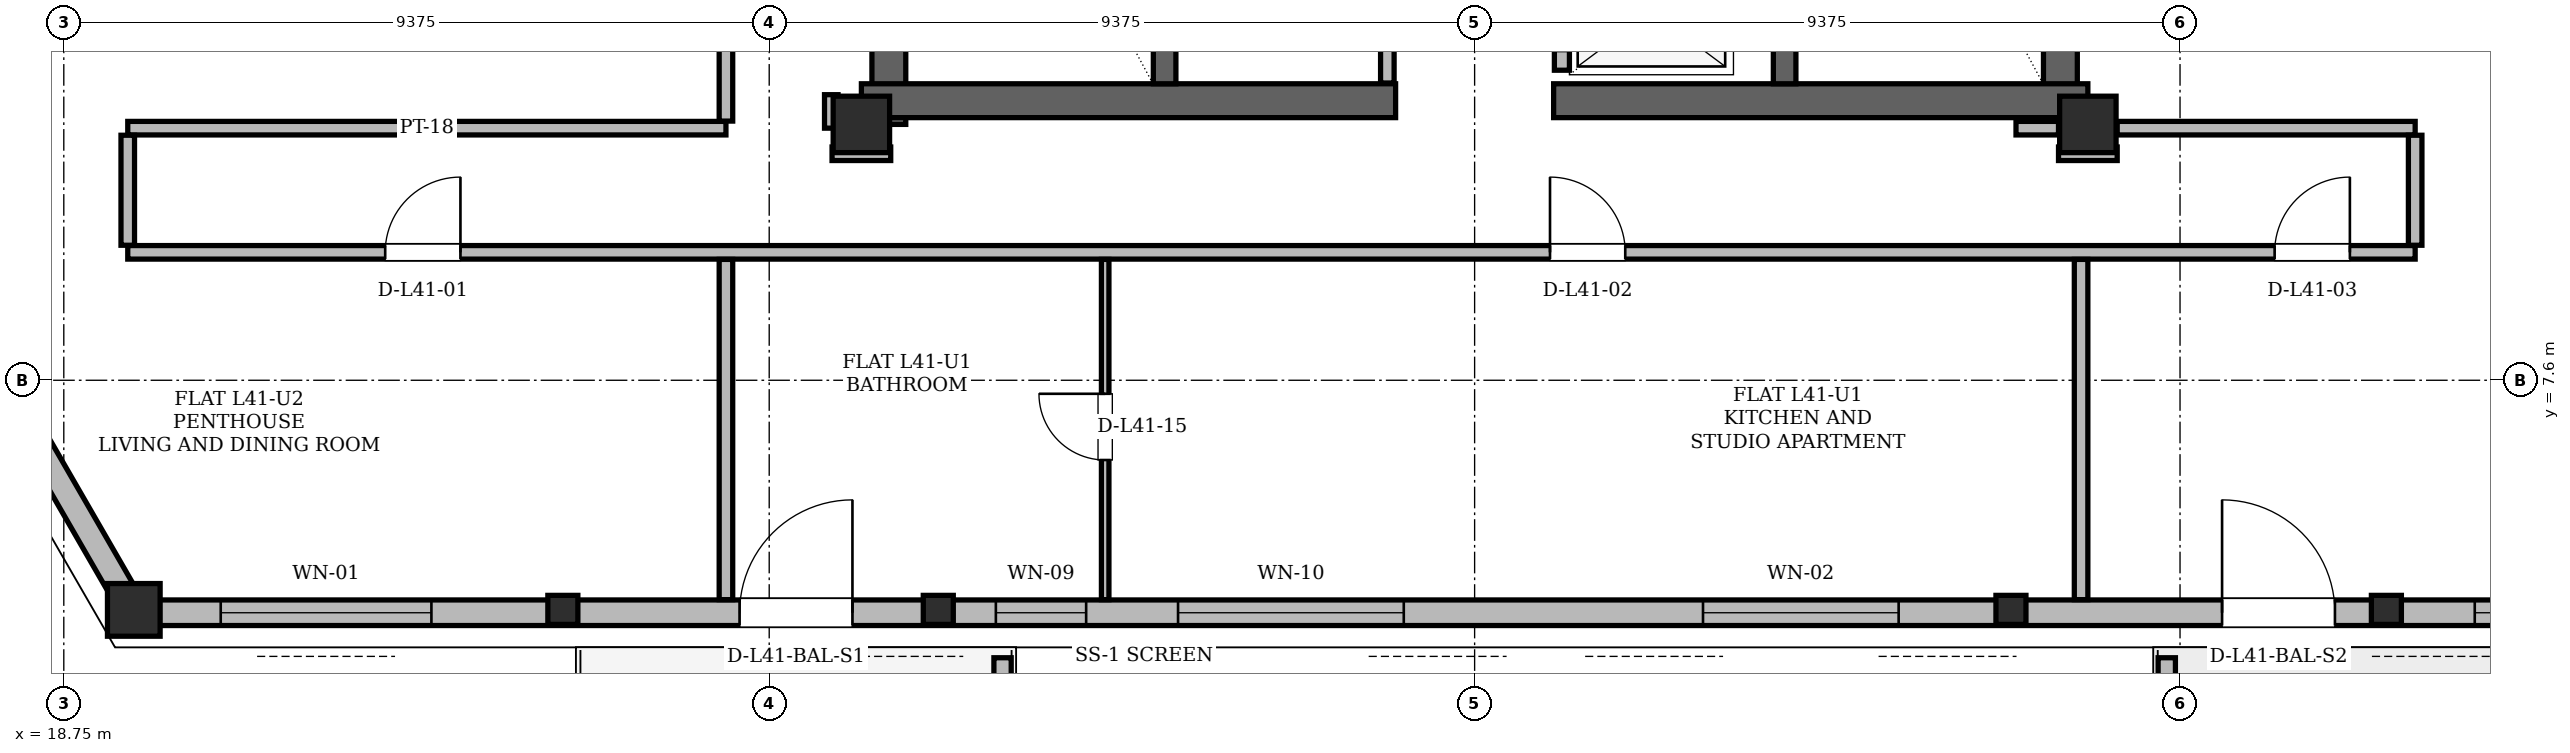
"""IFC4 building model, lengths in metres.
Left out: names, types, materials, properties, quantities, classifications, styles, units other than length and angle.
Written with IfcOpenShell. Run it as: python <this file> out.ifc"""

import sys

from ifc_helpers import new_model, si_unit, direction, frame, frame_2d, origin, origin_2d, place, context, subcontext, project, spatial, polyline, rectangle, hollow_rectangle, i_section, outline, extrude, element, fill, save


model = new_model("IFC4")
c1 = context("Model", 3, precision=1e-05, world=origin(), true_north=direction((0.0, 1.0)))
c2 = subcontext(c1, "Body", "Model", "MODEL_VIEW")
j1 = project(units=[si_unit("LENGTHUNIT", "METRE"), si_unit("PLANEANGLEUNIT", "RADIAN")], contexts=[c1])
p1 = place(None, origin())
s1 = spatial("IfcSite", under=j1, at=p1, CompositionType="ELEMENT")
p2 = place(p1, origin())
s2 = spatial("IfcBuilding", under=s1, at=p2, CompositionType="ELEMENT")
p3 = place(p2, frame((0.0, 0.0, 156.6)))
s3 = spatial("IfcBuildingStorey", under=s2, at=p3, CompositionType="ELEMENT", Elevation=156.6)
for number, where, z_axis, x_axis in (
    (1, (29.35, 11.0, 0.0), (0.0, 0.0, 1.0), (1.0, 0.0, 0.0)),
    (2, (45.65, 11.0, 0.0), (0.0, 0.0, 1.0), (1.0, 0.0, 0.0)),
):
    element("IfcColumn", number, at=place(p3, frame(where, z_axis=z_axis, x_axis=x_axis)), inside=s3, PredefinedType="COLUMN", context=c2, shape_type="SweptSolid", body=[
        extrude(hollow_rectangle(XDim=0.75, YDim=0.75, WallThickness=0.06, at=origin_2d()), origin(), (0.0, 0.0, 1.0), 3.6),
    ])
p4 = place(p3, frame((19.697, 4.511, 0.004), z_axis=(-0.009175617142, 0.021137903194, 0.999734463294), x_axis=(-0.917304359682, -0.398186779926, 0.0)))
e3 = element("IfcColumn", 3, at=p4, inside=s3, PredefinedType="COLUMN", context=c2, shape_type="SweptSolid", body=[
    extrude(hollow_rectangle(XDim=0.7, YDim=0.7, WallThickness=0.055, at=origin_2d()), origin(), (0.0, 0.0, 1.0), 3.592),
])
p5 = place(p3, frame((25.394, 4.511, 0.004), z_axis=(-0.006253154148, 0.021138379783, 0.999757003958), x_axis=(-0.958922443526, -0.283668375577, 0.0)))
e4 = element("IfcColumn", 4, at=p5, inside=s3, PredefinedType="COLUMN", context=c2, shape_type="SweptSolid", body=[
    extrude(i_section(OverallWidth=0.399, OverallDepth=0.386, WebThickness=0.021, FlangeThickness=0.033, at=origin_2d()), origin(), (0.0, 0.0, 1.0), 3.592),
])
for number, where, z_axis, x_axis in (
    (5, (30.379, 4.511, 0.004), (-0.004, 0.021, 1.0), (-0.985, -0.171, 0.0)),
    (6, (44.621, 4.511, 0.004), (0.004, 0.021, 1.0), (-0.985, 0.171, 0.0)),
):
    element("IfcColumn", number, at=place(p3, frame(where, z_axis=z_axis, x_axis=x_axis)), inside=s3, PredefinedType="COLUMN", context=c2, shape_type="SweptSolid", body=[
        extrude(i_section(OverallWidth=0.399, OverallDepth=0.386, WebThickness=0.021, FlangeThickness=0.033, at=origin_2d()), origin(), (0.0, 0.0, 1.0), 3.592),
    ])
p6 = place(p3, frame((49.606, 4.511, 0.004), z_axis=(0.006253154148, 0.021138379783, 0.999757003958), x_axis=(-0.958922443526, 0.283668375577, 0.0)))
e7 = element("IfcColumn", 7, at=p6, inside=s3, PredefinedType="COLUMN", context=c2, shape_type="SweptSolid", body=[
    extrude(i_section(OverallWidth=0.399, OverallDepth=0.386, WebThickness=0.021, FlangeThickness=0.033, at=origin_2d()), origin(), (0.0, 0.0, 1.0), 3.592),
])
for number, where, z_axis, x_axis in (
    (8, (29.715, 11.0, 0.0), (0.0, 0.0, 1.0), (0.0, 1.0, 0.0)),
    (9, (45.285, 11.0, 0.0), (0.0, 0.0, 1.0), (0.0, 1.0, 0.0)),
):
    element("IfcWall", number, at=place(p3, frame(where, z_axis=z_axis, x_axis=x_axis)), inside=s3, PredefinedType="SHEAR", context=c2, shape_type="SweptSolid", body=[
        extrude(rectangle(XDim=13.3, YDim=0.45, at=frame_2d((6.65, 0.0))), origin(), (0.0, 0.0, 1.0), 3.38),
    ])
for number, where, z_axis, x_axis in (
    (10, (29.35, 11.315, 0.0), (0.0, 0.0, 1.0), (1.0, 0.0, 0.0)),
    (11, (38.55, 11.315, 0.0), (0.0, 0.0, 1.0), (1.0, 0.0, 0.0)),
):
    element("IfcWall", number, at=place(p3, frame(where, z_axis=z_axis, x_axis=x_axis)), inside=s3, PredefinedType="SHEAR", context=c2, shape_type="SweptSolid", body=[
        extrude(rectangle(XDim=7.1, YDim=0.45, at=frame_2d((3.55, 0.0))), origin(), (0.0, 0.0, 1.0), 3.38),
    ])
for number, where, z_axis, x_axis in (
    (12, (33.38, 11.54, 0.0), (0.0, 0.0, 1.0), (0.0, 1.0, 0.0)),
    (13, (41.62, 11.54, 0.0), (0.0, 0.0, 1.0), (0.0, 1.0, 0.0)),
):
    element("IfcWall", number, at=place(p3, frame(where, z_axis=z_axis, x_axis=x_axis)), inside=s3, PredefinedType="SHEAR", context=c2, shape_type="SweptSolid", body=[
        extrude(rectangle(XDim=7.62, YDim=0.3, at=frame_2d((3.81, 0.0))), origin(), (0.0, 0.0, 1.0), 3.38),
    ])
p7 = place(p3, frame((15.098, 12.477, 0.0), z_axis=(0.0, 0.0, 1.0), x_axis=(0.500004288242, -0.866022927952, 0.0)))
e14 = element("IfcWall", 14, at=p7, inside=s3, PredefinedType="SOLIDWALL", context=c2, shape_type="SweptSolid", body=[
    extrude(rectangle(XDim=9.198, YDim=0.34, at=frame_2d((4.599, 0.0))), origin(), (0.0, 0.0, 1.0), 2.6),
])
p8 = place(p3, frame((19.697, 4.511, 0.0), z_axis=(0.0, 0.0, 1.0), x_axis=(1.0, 0.0, 0.0)))
e15 = element("IfcWall", 15, at=p8, inside=s3, PredefinedType="SOLIDWALL", context=c2, shape_type="SweptSolid", body=[
    extrude(rectangle(XDim=35.606, YDim=0.34, at=frame_2d((17.803, 0.0))), origin(), (0.0, 0.0, 1.0), 2.6),
])
p9 = place(p8, frame((8.034, 0.0, 0.0)))
e16 = element("IfcOpeningElement", 16, at=p9, cuts=e15, PredefinedType="OPENING", context=c2, shape_type="SweptSolid", body=[
    extrude(rectangle(XDim=1.5, YDim=2.2, at=frame_2d((0.75, 1.1))), frame((0.0, 0.17, 0.0), z_axis=(0.0, -1.0, 0.0), x_axis=(1.0, 0.0, 0.0)), (0.0, 0.0, 1.0), 0.34),
])
p10 = place(p8, frame((27.737, 0.0, 0.0)))
e17 = element("IfcOpeningElement", 17, at=p10, cuts=e15, PredefinedType="OPENING", context=c2, shape_type="SweptSolid", body=[
    extrude(rectangle(XDim=1.5, YDim=2.2, at=frame_2d((0.75, 1.1))), frame((0.0, 0.17, 0.0), z_axis=(0.0, -1.0, 0.0), x_axis=(1.0, 0.0, 0.0)), (0.0, 0.0, 1.0), 0.34),
])
p11 = place(p8, frame((13.862, 0.0, 0.85)))
e18 = element("IfcOpeningElement", 18, at=p11, cuts=e15, PredefinedType="OPENING", context=c2, shape_type="SweptSolid", body=[
    extrude(rectangle(XDim=3.0, YDim=1.64, at=frame_2d((1.5, 0.82))), frame((0.0, 0.17, 0.0), z_axis=(0.0, -1.0, 0.0), x_axis=(1.0, 0.0, 0.0)), (0.0, 0.0, 1.0), 0.34),
])
p12 = place(p8, frame((20.838, 0.0, 0.85)))
e19 = element("IfcOpeningElement", 19, at=p12, cuts=e15, PredefinedType="OPENING", context=c2, shape_type="SweptSolid", body=[
    extrude(rectangle(XDim=2.6, YDim=1.64, at=frame_2d((1.3, 0.82))), frame((0.0, 0.17, 0.0), z_axis=(0.0, -1.0, 0.0), x_axis=(1.0, 0.0, 0.0)), (0.0, 0.0, 1.0), 0.34),
])
p13 = place(p8, frame((11.44, 0.0, 0.85)))
e20 = element("IfcOpeningElement", 20, at=p13, cuts=e15, PredefinedType="OPENING", context=c2, shape_type="SweptSolid", body=[
    extrude(rectangle(XDim=1.2, YDim=1.48, at=frame_2d((0.6, 0.74))), frame((0.0, 0.17, 0.0), z_axis=(0.0, -1.0, 0.0), x_axis=(1.0, 0.0, 0.0)), (0.0, 0.0, 1.0), 0.34),
])
p14 = place(p8, frame((1.139, 0.0, 0.85)))
e21 = element("IfcOpeningElement", 21, at=p14, cuts=e15, PredefinedType="OPENING", context=c2, shape_type="SweptSolid", body=[
    extrude(rectangle(XDim=2.8, YDim=1.64, at=frame_2d((1.4, 0.82))), frame((0.0, 0.17, 0.0), z_axis=(0.0, -1.0, 0.0), x_axis=(1.0, 0.0, 0.0)), (0.0, 0.0, 1.0), 0.34),
])
p15 = place(p8, frame((31.095, 0.0, 0.85)))
e22 = element("IfcOpeningElement", 22, at=p15, cuts=e15, PredefinedType="OPENING", context=c2, shape_type="SweptSolid", body=[
    extrude(rectangle(XDim=3.0, YDim=1.64, at=frame_2d((1.5, 0.82))), frame((0.0, 0.17, 0.0), z_axis=(0.0, -1.0, 0.0), x_axis=(1.0, 0.0, 0.0)), (0.0, 0.0, 1.0), 0.34),
])
for number, where, z_axis, x_axis in (
    (23, (31.226, 3.913, 0.0), (0.0, 0.0, 1.0), (0.0, -1.0, 0.0)),
    (24, (46.699, 3.913, 0.0), (0.0, 0.0, 1.0), (0.0, -1.0, 0.0)),
):
    element("IfcWall", number, at=place(p3, frame(where, z_axis=z_axis, x_axis=x_axis)), inside=s3, PredefinedType="PARAPET", context=c2, shape_type="SweptSolid", body=[
        extrude(outline(polyline([(0.0, 0.0), (2.042, 0.0), (2.042, 1.1), (0.0, 1.32), (0.0, 0.0)])), frame((0.0, 0.115, 0.0), z_axis=(0.0, -1.0, 0.0), x_axis=(1.0, 0.0, 0.0)), (0.0, 0.0, 1.0), 0.23),
    ])
p16 = place(p3, frame((36.34, 11.55, 0.0), z_axis=(0.0, 0.0, 1.0), x_axis=(0.0, 1.0, 0.0)))
e25 = element("IfcWall", 25, at=p16, inside=s3, PredefinedType="PARTITIONING", context=c2, shape_type="SweptSolid", body=[
    extrude(rectangle(XDim=5.55, YDim=0.18, at=frame_2d((2.775, 0.0))), origin(), (0.0, 0.0, 1.0), 3.38),
])
p17 = place(p16, frame((2.85, 0.0, 0.0)))
e26 = element("IfcOpeningElement", 26, at=p17, cuts=e25, PredefinedType="OPENING", context=c2, shape_type="SweptSolid", body=[
    extrude(rectangle(XDim=0.95, YDim=2.1, at=frame_2d((0.475, 1.05))), frame((0.0, 0.09, 0.0), z_axis=(0.0, -1.0, 0.0), x_axis=(1.0, 0.0, 0.0)), (0.0, 0.0, 1.0), 0.18),
])
p18 = place(p3, frame((38.66, 11.72, 0.0), z_axis=(0.0, 0.0, 1.0), x_axis=(0.0, 1.0, 0.0)))
e27 = element("IfcWall", 27, at=p18, inside=s3, PredefinedType="PARTITIONING", context=c2, shape_type="SweptSolid", body=[
    extrude(rectangle(XDim=9.1, YDim=0.2, at=frame_2d((4.55, 0.0))), origin(), (0.0, 0.0, 1.0), 3.38),
])
p19 = place(p18, frame((0.255, 0.0, 0.0)))
e28 = element("IfcOpeningElement", 28, at=p19, cuts=e27, PredefinedType="OPENING", context=c2, shape_type="SweptSolid", body=[
    extrude(rectangle(XDim=1.05, YDim=2.15, at=frame_2d((0.525, 1.075))), frame((0.0, 0.1, 0.0), z_axis=(0.0, -1.0, 0.0), x_axis=(1.0, 0.0, 0.0)), (0.0, 0.0, 1.0), 0.2),
])
p20 = place(p18, frame((2.105, 0.0, 0.0)))
e29 = element("IfcOpeningElement", 29, at=p20, cuts=e27, PredefinedType="OPENING", context=c2, shape_type="SweptSolid", body=[
    extrude(rectangle(XDim=1.05, YDim=2.15, at=frame_2d((0.525, 1.075))), frame((0.0, 0.1, 0.0), z_axis=(0.0, -1.0, 0.0), x_axis=(1.0, 0.0, 0.0)), (0.0, 0.0, 1.0), 0.2),
])
p21 = place(p18, frame((3.955, 0.0, 0.0)))
e30 = element("IfcOpeningElement", 30, at=p21, cuts=e27, PredefinedType="OPENING", context=c2, shape_type="SweptSolid", body=[
    extrude(rectangle(XDim=1.05, YDim=2.15, at=frame_2d((0.525, 1.075))), frame((0.0, 0.1, 0.0), z_axis=(0.0, -1.0, 0.0), x_axis=(1.0, 0.0, 0.0)), (0.0, 0.0, 1.0), 0.2),
])
p22 = place(p3, frame((19.6, 9.3, 0.0), z_axis=(0.0, 0.0, 1.0), x_axis=(1.0, 0.0, 0.0)))
e31 = element("IfcWall", 31, at=p22, inside=s3, PredefinedType="PARTITIONING", context=c2, shape_type="SweptSolid", body=[
    extrude(rectangle(XDim=30.4, YDim=0.18, at=frame_2d((15.2, 0.0))), origin(), (0.0, 0.0, 1.0), 2.842),
])
p23 = place(p22, frame((3.421, 0.0, 0.0)))
e32 = element("IfcOpeningElement", 32, at=p23, cuts=e31, PredefinedType="OPENING", context=c2, shape_type="SweptSolid", body=[
    extrude(rectangle(XDim=1.0, YDim=2.18, at=frame_2d((0.5, 1.09))), frame((0.0, 0.09, 0.0), z_axis=(0.0, -1.0, 0.0), x_axis=(1.0, 0.0, 0.0)), (0.0, 0.0, 1.0), 0.18),
])
p24 = place(p22, frame((18.902, 0.0, 0.0)))
e33 = element("IfcOpeningElement", 33, at=p24, cuts=e31, PredefinedType="OPENING", context=c2, shape_type="SweptSolid", body=[
    extrude(rectangle(XDim=1.0, YDim=2.18, at=frame_2d((0.5, 1.09))), frame((0.0, 0.09, 0.0), z_axis=(0.0, -1.0, 0.0), x_axis=(1.0, 0.0, 0.0)), (0.0, 0.0, 1.0), 0.18),
])
p25 = place(p22, frame((28.532, 0.0, 0.0)))
e34 = element("IfcOpeningElement", 34, at=p25, cuts=e31, PredefinedType="OPENING", context=c2, shape_type="SweptSolid", body=[
    extrude(rectangle(XDim=1.0, YDim=2.18, at=frame_2d((0.5, 1.09))), frame((0.0, 0.09, 0.0), z_axis=(0.0, -1.0, 0.0), x_axis=(1.0, 0.0, 0.0)), (0.0, 0.0, 1.0), 0.18),
])
for number, where, z_axis, x_axis in (
    (35, (28.96, 10.61, 0.0), (0.0, 0.0, 1.0), (1.0, 0.0, 0.0)),
    (36, (45.26, 10.61, 0.0), (0.0, 0.0, 1.0), (1.0, 0.0, 0.0)),
):
    element("IfcWall", number, at=place(p3, frame(where, z_axis=z_axis, x_axis=x_axis)), inside=s3, PredefinedType="PARTITIONING", context=c2, shape_type="SweptSolid", body=[
        extrude(rectangle(XDim=0.78, YDim=0.18, at=frame_2d((0.39, 0.0))), origin(), (0.0, 0.0, 1.0), 3.38),
    ])
p26 = place(p3, frame((19.6, 10.95, 0.0), z_axis=(0.0, 0.0, 1.0), x_axis=(1.0, 0.0, 0.0)))
e37 = element("IfcWall", 37, at=p26, inside=s3, PredefinedType="PARTITIONING", context=c2, shape_type="SweptSolid", body=[
    extrude(rectangle(XDim=7.95, YDim=0.18, at=frame_2d((3.975, 0.0))), origin(), (0.0, 0.0, 1.0), 3.38),
])
p27 = place(p3, frame((44.695, 10.95, 0.0), z_axis=(0.0, 0.0, 1.0), x_axis=(1.0, 0.0, 0.0)))
e38 = element("IfcWall", 38, at=p27, inside=s3, PredefinedType="PARTITIONING", context=c2, shape_type="SweptSolid", body=[
    extrude(rectangle(XDim=0.565, YDim=0.18, at=frame_2d((0.282, 0.0))), origin(), (0.0, 0.0, 1.0), 2.42),
])
p28 = place(p3, frame((46.04, 10.95, 0.0), z_axis=(0.0, 0.0, 1.0), x_axis=(1.0, 0.0, 0.0)))
e39 = element("IfcWall", 39, at=p28, inside=s3, PredefinedType="PARTITIONING", context=c2, shape_type="SweptSolid", body=[
    extrude(rectangle(XDim=3.96, YDim=0.18, at=frame_2d((1.98, 0.0))), origin(), (0.0, 0.0, 1.0), 2.842),
])
p29 = place(p3, frame((19.6, 9.394, 0.0), z_axis=(0.0, 0.0, 1.0), x_axis=(0.0, 1.0, 0.0)))
e40 = element("IfcWall", 40, at=p29, inside=s3, PredefinedType="PARTITIONING", context=c2, shape_type="SweptSolid", body=[
    extrude(rectangle(XDim=1.462, YDim=0.18, at=frame_2d((0.731, 0.0))), origin(), (0.0, 0.0, 1.0), 3.38),
])
p30 = place(p3, frame((27.55, 4.685, 0.0), z_axis=(0.0, 0.0, 1.0), x_axis=(0.0, 1.0, 0.0)))
e41 = element("IfcWall", 41, at=p30, inside=s3, PredefinedType="PARTITIONING", context=c2, shape_type="SweptSolid", body=[
    extrude(rectangle(XDim=4.521, YDim=0.18, at=frame_2d((2.261, 0.0))), origin(), (0.0, 0.0, 1.0), 2.966),
])
p31 = place(p3, frame((27.55, 11.044, 0.0), z_axis=(0.0, 0.0, 1.0), x_axis=(0.0, 1.0, 0.0)))
e42 = element("IfcWall", 42, at=p31, inside=s3, PredefinedType="PARTITIONING", context=c2, shape_type="SweptSolid", body=[
    extrude(rectangle(XDim=5.712, YDim=0.18, at=frame_2d((2.856, 0.0))), origin(), (0.0, 0.0, 1.0), 2.842),
])
p32 = place(p3, frame((28.95, 10.95, 0.0), z_axis=(0.0, 0.0, 1.0), x_axis=(0.0, 1.0, 0.0)))
e43 = element("IfcWall", 43, at=p32, inside=s3, PredefinedType="PARTITIONING", context=c2, shape_type="SweptSolid", body=[
    extrude(rectangle(XDim=0.445, YDim=0.18, at=frame_2d((0.223, 0.0))), origin(), (0.0, 0.0, 1.0), 2.842),
])
p33 = place(p3, frame((32.59, 4.685, 0.0), z_axis=(0.0, 0.0, 1.0), x_axis=(0.0, 1.0, 0.0)))
e44 = element("IfcWall", 44, at=p33, inside=s3, PredefinedType="PARTITIONING", context=c2, shape_type="SweptSolid", body=[
    extrude(rectangle(XDim=4.521, YDim=0.1, at=frame_2d((2.261, 0.0))), origin(), (0.0, 0.0, 1.0), 2.966),
])
p34 = place(p33, frame((1.856, 0.0, 0.0)))
e45 = element("IfcOpeningElement", 45, at=p34, cuts=e44, PredefinedType="OPENING", context=c2, shape_type="SweptSolid", body=[
    extrude(rectangle(XDim=0.88, YDim=2.08, at=frame_2d((0.44, 1.04))), frame((0.0, 0.05, 0.0), z_axis=(0.0, -1.0, 0.0), x_axis=(1.0, 0.0, 0.0)), (0.0, 0.0, 1.0), 0.1),
])
p35 = place(p3, frame((45.56, 4.685, 0.0), z_axis=(0.0, 0.0, 1.0), x_axis=(0.0, 1.0, 0.0)))
e46 = element("IfcWall", 46, at=p35, inside=s3, PredefinedType="PARTITIONING", context=c2, shape_type="SweptSolid", body=[
    extrude(rectangle(XDim=4.521, YDim=0.18, at=frame_2d((2.261, 0.0))), origin(), (0.0, 0.0, 1.0), 2.966),
])
p36 = place(p3, frame((50.0, 9.394, 0.0), z_axis=(0.0, 0.0, 1.0), x_axis=(0.0, 1.0, 0.0)))
e47 = element("IfcWall", 47, at=p36, inside=s3, PredefinedType="PARTITIONING", context=c2, shape_type="SweptSolid", body=[
    extrude(rectangle(XDim=1.462, YDim=0.18, at=frame_2d((0.731, 0.0))), origin(), (0.0, 0.0, 1.0), 3.38),
])
p37 = place(p9, origin())
e48 = element("IfcDoor", 48, at=p37, inside=s3, OperationType="SINGLE_SWING_RIGHT", PredefinedType="DOOR", context=c2, shape_type="SweptSolid", body=[
    extrude(rectangle(XDim=1.5, YDim=2.2, at=frame_2d((0.75, 1.1))), frame((0.0, 0.025, 0.0), z_axis=(0.0, -1.0, 0.0), x_axis=(1.0, 0.0, 0.0)), (0.0, 0.0, 1.0), 0.05),
])
fill(e16, e48)
p38 = place(p10, origin())
e49 = element("IfcDoor", 49, at=p38, inside=s3, OperationType="SINGLE_SWING_LEFT", PredefinedType="DOOR", context=c2, shape_type="SweptSolid", body=[
    extrude(rectangle(XDim=1.5, YDim=2.2, at=frame_2d((0.75, 1.1))), frame((0.0, 0.025, 0.0), z_axis=(0.0, -1.0, 0.0), x_axis=(1.0, 0.0, 0.0)), (0.0, 0.0, 1.0), 0.05),
])
fill(e17, e49)
p39 = place(p11, origin())
e50 = element("IfcWindow", 50, at=p39, inside=s3, PartitioningType="SINGLE_PANEL", PredefinedType="WINDOW", context=c2, shape_type="SweptSolid", body=[
    extrude(rectangle(XDim=3.0, YDim=1.64, at=frame_2d((1.5, 0.82))), frame((0.0, 0.03, 0.0), z_axis=(0.0, -1.0, 0.0), x_axis=(1.0, 0.0, 0.0)), (0.0, 0.0, 1.0), 0.06),
])
fill(e18, e50)
p40 = place(p12, origin())
e51 = element("IfcWindow", 51, at=p40, inside=s3, PartitioningType="SINGLE_PANEL", PredefinedType="WINDOW", context=c2, shape_type="SweptSolid", body=[
    extrude(rectangle(XDim=2.6, YDim=1.64, at=frame_2d((1.3, 0.82))), frame((0.0, 0.03, 0.0), z_axis=(0.0, -1.0, 0.0), x_axis=(1.0, 0.0, 0.0)), (0.0, 0.0, 1.0), 0.06),
])
fill(e19, e51)
p41 = place(p13, origin())
e52 = element("IfcWindow", 52, at=p41, inside=s3, PartitioningType="SINGLE_PANEL", PredefinedType="WINDOW", context=c2, shape_type="SweptSolid", body=[
    extrude(rectangle(XDim=1.2, YDim=1.48, at=frame_2d((0.6, 0.74))), frame((0.0, 0.03, 0.0), z_axis=(0.0, -1.0, 0.0), x_axis=(1.0, 0.0, 0.0)), (0.0, 0.0, 1.0), 0.06),
])
fill(e20, e52)
p42 = place(p14, origin())
e53 = element("IfcWindow", 53, at=p42, inside=s3, PartitioningType="SINGLE_PANEL", PredefinedType="WINDOW", context=c2, shape_type="SweptSolid", body=[
    extrude(rectangle(XDim=2.8, YDim=1.64, at=frame_2d((1.4, 0.82))), frame((0.0, 0.03, 0.0), z_axis=(0.0, -1.0, 0.0), x_axis=(1.0, 0.0, 0.0)), (0.0, 0.0, 1.0), 0.06),
])
fill(e21, e53)
p43 = place(p15, origin())
e54 = element("IfcWindow", 54, at=p43, inside=s3, PartitioningType="SINGLE_PANEL", PredefinedType="WINDOW", context=c2, shape_type="SweptSolid", body=[
    extrude(rectangle(XDim=3.0, YDim=1.64, at=frame_2d((1.5, 0.82))), frame((0.0, 0.03, 0.0), z_axis=(0.0, -1.0, 0.0), x_axis=(1.0, 0.0, 0.0)), (0.0, 0.0, 1.0), 0.06),
])
fill(e22, e54)
p44 = place(p23, origin())
e55 = element("IfcDoor", 55, at=p44, inside=s3, OperationType="SINGLE_SWING_RIGHT", PredefinedType="DOOR", context=c2, shape_type="SweptSolid", body=[
    extrude(rectangle(XDim=1.0, YDim=2.18, at=frame_2d((0.5, 1.09))), frame((0.0, 0.025, 0.0), z_axis=(0.0, -1.0, 0.0), x_axis=(1.0, 0.0, 0.0)), (0.0, 0.0, 1.0), 0.05),
])
fill(e32, e55)
p45 = place(p24, origin())
e56 = element("IfcDoor", 56, at=p45, inside=s3, OperationType="SINGLE_SWING_LEFT", PredefinedType="DOOR", context=c2, shape_type="SweptSolid", body=[
    extrude(rectangle(XDim=1.0, YDim=2.18, at=frame_2d((0.5, 1.09))), frame((0.0, 0.025, 0.0), z_axis=(0.0, -1.0, 0.0), x_axis=(1.0, 0.0, 0.0)), (0.0, 0.0, 1.0), 0.05),
])
fill(e33, e56)
p46 = place(p25, origin())
e57 = element("IfcDoor", 57, at=p46, inside=s3, OperationType="SINGLE_SWING_RIGHT", PredefinedType="DOOR", context=c2, shape_type="SweptSolid", body=[
    extrude(rectangle(XDim=1.0, YDim=2.18, at=frame_2d((0.5, 1.09))), frame((0.0, 0.025, 0.0), z_axis=(0.0, -1.0, 0.0), x_axis=(1.0, 0.0, 0.0)), (0.0, 0.0, 1.0), 0.05),
])
fill(e34, e57)
p47 = place(p34, origin())
e58 = element("IfcDoor", 58, at=p47, inside=s3, OperationType="SINGLE_SWING_RIGHT", PredefinedType="DOOR", context=c2, shape_type="SweptSolid", body=[
    extrude(rectangle(XDim=0.88, YDim=2.08, at=frame_2d((0.44, 1.04))), frame((0.0, 0.025, 0.0), z_axis=(0.0, -1.0, 0.0), x_axis=(1.0, 0.0, 0.0)), (0.0, 0.0, 1.0), 0.05),
])
fill(e45, e58)
save(model, sys.argv[1])
